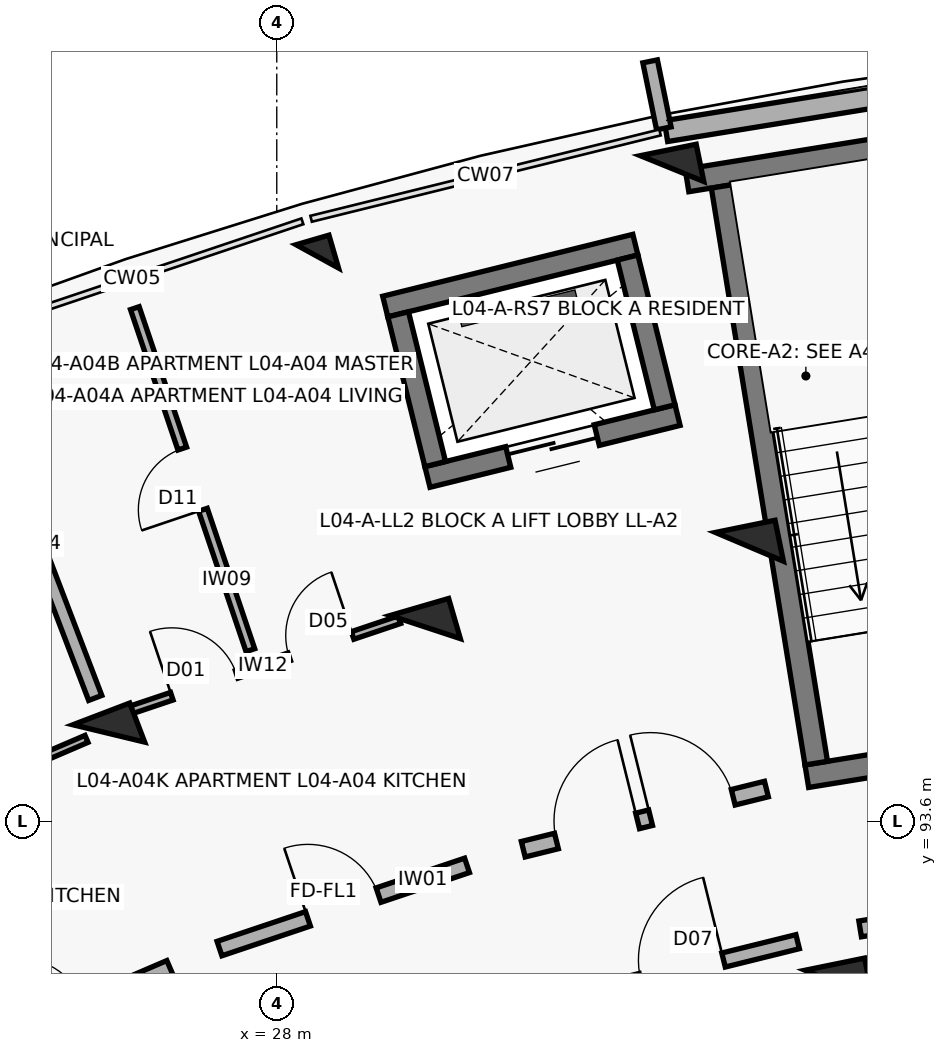
"""IFC4 building model, lengths in metres.
Left out: names, types, materials, properties, quantities, classifications, styles, units other than length and angle.
Written with IfcOpenShell. Run it as: python <this file> out.ifc"""

import sys

from ifc_helpers import new_model, si_unit, direction, frame, frame_2d, origin, origin_2d, place, context, subcontext, project, spatial, rectangle, extrude, element, fill, save


model = new_model("IFC4")
c1 = context("Model", 3, precision=1e-05, world=origin(), true_north=direction((0.0, 1.0)))
c2 = subcontext(c1, "Body", "Model", "MODEL_VIEW")
j1 = project(units=[si_unit("LENGTHUNIT", "METRE"), si_unit("PLANEANGLEUNIT", "RADIAN")], contexts=[c1])
p1 = place(None, origin())
s1 = spatial("IfcSite", under=j1, at=p1, CompositionType="ELEMENT")
p2 = place(p1, origin())
s2 = spatial("IfcBuilding", under=s1, at=p2, CompositionType="ELEMENT")
p3 = place(p2, frame((0.0, 0.0, 14.3)))
s3 = spatial("IfcBuildingStorey", under=s2, at=p3, CompositionType="ELEMENT", Elevation=14.3)
for number, where, z_axis, x_axis in (
    (1, (25.79, 94.753, 0.0), (0.0, 0.0, 1.0), (-0.357, 0.934, 0.0)),
    (2, (29.954, 96.153, 0.0), (0.0, 0.0, 1.0), (-0.28, 0.96, 0.0)),
):
    element("IfcColumn", number, at=place(p3, frame(where, z_axis=z_axis, x_axis=x_axis)), inside=s3, PredefinedType="COLUMN", context=c2, shape_type="SweptSolid", body=[
        extrude(rectangle(XDim=0.55, YDim=0.8, at=origin_2d()), origin(), (0.0, 0.0, 1.0), 3.1),
    ])
p4 = place(p3, frame((28.533, 101.031, 0.0), z_axis=(0.0, 0.0, 1.0), x_axis=(-0.27966144946, 0.96009867914, 0.0)))
e3 = element("IfcColumn", 3, at=p4, inside=s3, PredefinedType="COLUMN", context=c2, shape_type="SweptSolid", body=[
    extrude(rectangle(XDim=0.45, YDim=0.45, at=origin_2d()), origin(), (0.0, 0.0, 1.0), 3.1),
])
for number, where, z_axis, x_axis in (
    (4, (35.397, 91.448, 0.0), (0.0, 0.0, 1.0), (-0.2, 0.98, 0.0)),
    (5, (34.219, 97.209, 0.0), (0.0, 0.0, 1.0), (-0.2, 0.98, 0.0)),
):
    element("IfcColumn", number, at=place(p3, frame(where, z_axis=z_axis, x_axis=x_axis)), inside=s3, PredefinedType="COLUMN", context=c2, shape_type="SweptSolid", body=[
        extrude(rectangle(XDim=0.55, YDim=0.8, at=origin_2d()), origin(), (0.0, 0.0, 1.0), 3.1),
    ])
p5 = place(p3, frame((33.201, 102.186, 0.0), z_axis=(0.0, 0.0, 1.0), x_axis=(-0.200393999665, 0.979715389742, 0.0)))
e6 = element("IfcColumn", 6, at=p5, inside=s3, PredefinedType="COLUMN", context=c2, shape_type="SweptSolid", body=[
    extrude(rectangle(XDim=0.5, YDim=0.75, at=origin_2d()), origin(), (0.0, 0.0, 1.0), 3.1),
])
p6 = place(p3, frame((33.12, 102.679, 0.0), z_axis=(0.0, 0.0, 1.0), x_axis=(0.987080750493, 0.160223568819, 0.0)))
e7 = element("IfcWall", 7, at=p6, inside=s3, PredefinedType="SOLIDWALL", context=c2, shape_type="SweptSolid", body=[
    extrude(rectangle(XDim=4.809, YDim=0.278, at=frame_2d((2.404, 0.0))), origin(), (0.0, 0.0, 1.0), 2.25),
])
p7 = place(p3, frame((33.093, 102.715, 0.0), z_axis=(0.0, 0.0, 1.0), x_axis=(-0.200183211319, 0.979758481416, 0.0)))
e8 = element("IfcWall", 8, at=p7, inside=s3, PredefinedType="PARAPET", context=c2, shape_type="SweptSolid", body=[
    extrude(rectangle(XDim=0.9, YDim=0.195, at=frame_2d((0.45, 0.0))), origin(), (0.0, 0.0, 1.0), 2.25),
])
p8 = place(p3, frame((38.794, 94.811, 0.0), z_axis=(0.0, 0.0, 1.0), x_axis=(-0.987077443397, -0.160243941341, 0.0)))
e9 = element("IfcWall", 9, at=p8, inside=s3, PredefinedType="SHEAR", context=c2, shape_type="SweptSolid", body=[
    extrude(rectangle(XDim=3.87, YDim=0.3, at=frame_2d((1.935, 0.0))), origin(), (0.0, 0.0, 1.0), 3.1),
])
p9 = place(p8, frame((1.41, 0.0, 0.0)))
e10 = element("IfcOpeningElement", 10, at=p9, cuts=e9, PredefinedType="OPENING", context=c2, shape_type="SweptSolid", body=[
    extrude(rectangle(XDim=1.05, YDim=2.15, at=frame_2d((0.525, 1.075))), frame((0.0, 0.16, 0.0), z_axis=(0.0, -1.0, 0.0), x_axis=(1.0, 0.0, 0.0)), (0.0, 0.0, 1.0), 0.32),
])
p10 = place(p3, frame((37.81, 102.745, 0.0), z_axis=(0.0, 0.0, 1.0), x_axis=(-0.987084710126, -0.160199173019, 0.0)))
e11 = element("IfcWall", 11, at=p10, inside=s3, PredefinedType="SHEAR", context=c2, shape_type="SweptSolid", body=[
    extrude(rectangle(XDim=4.47, YDim=0.3, at=frame_2d((2.235, 0.0))), origin(), (0.0, 0.0, 1.0), 3.1),
])
p11 = place(p3, frame((35.098, 94.363, 0.0), z_axis=(0.0, 0.0, 1.0), x_axis=(-0.160227496777, 0.987080112897, 0.0)))
e12 = element("IfcWall", 12, at=p11, inside=s3, PredefinedType="SHEAR", context=c2, shape_type="SweptSolid", body=[
    extrude(rectangle(XDim=7.69, YDim=0.3, at=frame_2d((3.845, 0.0))), origin(), (0.0, 0.0, 1.0), 3.1),
])
p12 = place(p3, frame((33.273, 98.942, 0.0), z_axis=(0.0, 0.0, 1.0), x_axis=(-0.970707542441, -0.240264160972, 0.0)))
e13 = element("IfcWall", 13, at=p12, inside=s3, PredefinedType="SHEAR", context=c2, shape_type="SweptSolid", body=[
    extrude(rectangle(XDim=3.39, YDim=0.28, at=frame_2d((1.695, 0.0))), origin(), (0.0, 0.0, 1.0), 3.1),
])
p13 = place(p12, frame((1.095, 0.0, 0.0)))
e14 = element("IfcOpeningElement", 14, at=p13, cuts=e13, PredefinedType="OPENING", context=c2, shape_type="SweptSolid", body=[
    extrude(rectangle(XDim=1.2, YDim=2.15, at=frame_2d((0.6, 1.075))), frame((0.0, 0.15, 0.0), z_axis=(0.0, -1.0, 0.0), x_axis=(1.0, 0.0, 0.0)), (0.0, 0.0, 1.0), 0.3),
])
p14 = place(p3, frame((32.718, 101.185, 0.0), z_axis=(0.0, 0.0, 1.0), x_axis=(-0.970711699588, -0.240247364777, 0.0)))
e15 = element("IfcWall", 15, at=p14, inside=s3, PredefinedType="SHEAR", context=c2, shape_type="SweptSolid", body=[
    extrude(rectangle(XDim=3.39, YDim=0.28, at=frame_2d((1.695, 0.0))), origin(), (0.0, 0.0, 1.0), 3.1),
])
p15 = place(p3, frame((33.104, 99.044, 0.0), z_axis=(0.0, 0.0, 1.0), x_axis=(-0.240186044774, 0.970726873995, 0.0)))
e16 = element("IfcWall", 16, at=p15, inside=s3, PredefinedType="SHEAR", context=c2, shape_type="SweptSolid", body=[
    extrude(rectangle(XDim=2.03, YDim=0.28, at=frame_2d((1.015, 0.0))), origin(), (0.0, 0.0, 1.0), 3.1),
])
p16 = place(p3, frame((30.085, 98.297, 0.0), z_axis=(0.0, 0.0, 1.0), x_axis=(-0.2402993748, 0.970698825832, 0.0)))
e17 = element("IfcWall", 17, at=p16, inside=s3, PredefinedType="SHEAR", context=c2, shape_type="SweptSolid", body=[
    extrude(rectangle(XDim=2.03, YDim=0.28, at=frame_2d((1.015, 0.0))), origin(), (0.0, 0.0, 1.0), 3.1),
])
p17 = place(p3, frame((23.437, 90.316, 0.0), z_axis=(0.0, 0.0, 1.0), x_axis=(0.918718172399, 0.394913813008, 0.0)))
e18 = element("IfcWall", 18, at=p17, inside=s3, PredefinedType="SOLIDWALL", context=c2, shape_type="SweptSolid", body=[
    extrude(rectangle(XDim=3.436, YDim=0.2, at=frame_2d((1.718, 0.0))), origin(), (0.0, 0.0, 1.0), 2.08),
])
p18 = place(p17, frame((1.208, 0.0, 0.0)))
e19 = element("IfcOpeningElement", 19, at=p18, cuts=e18, PredefinedType="OPENING", context=c2, shape_type="SweptSolid", body=[
    extrude(rectangle(XDim=1.02, YDim=2.15, at=frame_2d((0.51, 1.075))), frame((0.0, 0.11, 0.0), z_axis=(0.0, -1.0, 0.0), x_axis=(1.0, 0.0, 0.0)), (0.0, 0.0, 1.0), 0.22),
])
p19 = place(p3, frame((22.008, 93.182, 0.0), z_axis=(0.0, 0.0, 1.0), x_axis=(0.918732171064, 0.394881245253, 0.0)))
e20 = element("IfcWall", 20, at=p19, inside=s3, PredefinedType="PARTITIONING", context=c2, shape_type="SweptSolid", body=[
    extrude(rectangle(XDim=3.797, YDim=0.1, at=frame_2d((1.899, 0.0))), origin(), (0.0, 0.0, 1.0), 2.08),
])
p20 = place(p19, frame((0.65, 0.0, 0.0)))
e21 = element("IfcOpeningElement", 21, at=p20, cuts=e20, PredefinedType="OPENING", context=c2, shape_type="SweptSolid", body=[
    extrude(rectangle(XDim=0.9, YDim=2.1, at=frame_2d((0.45, 1.05))), frame((0.0, 0.06, 0.0), z_axis=(0.0, -1.0, 0.0), x_axis=(1.0, 0.0, 0.0)), (0.0, 0.0, 1.0), 0.12),
])
p21 = place(p19, frame((2.267, 0.0, 0.0)))
e22 = element("IfcOpeningElement", 22, at=p21, cuts=e20, PredefinedType="OPENING", context=c2, shape_type="SweptSolid", body=[
    extrude(rectangle(XDim=0.88, YDim=2.1, at=frame_2d((0.44, 1.05))), frame((0.0, 0.06, 0.0), z_axis=(0.0, -1.0, 0.0), x_axis=(1.0, 0.0, 0.0)), (0.0, 0.0, 1.0), 0.12),
])
p22 = place(p3, frame((27.247, 91.923, 0.0), z_axis=(0.0, 0.0, 1.0), x_axis=(0.947863007629, 0.318678080151, 0.0)))
e23 = element("IfcWall", 23, at=p22, inside=s3, PredefinedType="SOLIDWALL", context=c2, shape_type="SweptSolid", body=[
    extrude(rectangle(XDim=3.436, YDim=0.2, at=frame_2d((1.718, 0.0))), origin(), (0.0, 0.0, 1.0), 2.08),
])
p23 = place(p22, frame((1.228, 0.0, 0.0)))
e24 = element("IfcOpeningElement", 24, at=p23, cuts=e23, PredefinedType="OPENING", context=c2, shape_type="SweptSolid", body=[
    extrude(rectangle(XDim=0.98, YDim=2.15, at=frame_2d((0.49, 1.075))), frame((0.0, 0.11, 0.0), z_axis=(0.0, -1.0, 0.0), x_axis=(1.0, 0.0, 0.0)), (0.0, 0.0, 1.0), 0.22),
])
p24 = place(p3, frame((26.003, 95.036, 0.0), z_axis=(0.0, 0.0, 1.0), x_axis=(0.947879193428, 0.318629933725, 0.0)))
e25 = element("IfcWall", 25, at=p24, inside=s3, PredefinedType="PARTITIONING", context=c2, shape_type="SweptSolid", body=[
    extrude(rectangle(XDim=3.81, YDim=0.105, at=frame_2d((1.905, 0.0))), origin(), (0.0, 0.0, 1.0), 2.08),
])
p25 = place(p24, frame((0.65, 0.0, 0.0)))
e26 = element("IfcOpeningElement", 26, at=p25, cuts=e25, PredefinedType="OPENING", context=c2, shape_type="SweptSolid", body=[
    extrude(rectangle(XDim=0.9, YDim=2.1, at=frame_2d((0.45, 1.05))), frame((0.0, 0.062, 0.0), z_axis=(0.0, -1.0, 0.0), x_axis=(1.0, 0.0, 0.0)), (0.0, 0.0, 1.0), 0.125),
])
p26 = place(p24, frame((2.28, 0.0, 0.0)))
e27 = element("IfcOpeningElement", 27, at=p26, cuts=e25, PredefinedType="OPENING", context=c2, shape_type="SweptSolid", body=[
    extrude(rectangle(XDim=0.88, YDim=2.1, at=frame_2d((0.44, 1.05))), frame((0.0, 0.062, 0.0), z_axis=(0.0, -1.0, 0.0), x_axis=(1.0, 0.0, 0.0)), (0.0, 0.0, 1.0), 0.125),
])
p27 = place(p3, frame((27.653, 95.849, 0.0), z_axis=(0.0, 0.0, 1.0), x_axis=(-0.320049134076, 0.947400945628, 0.0)))
e28 = element("IfcWall", 28, at=p27, inside=s3, PredefinedType="PARTITIONING", context=c2, shape_type="SweptSolid", body=[
    extrude(rectangle(XDim=4.75, YDim=0.12, at=frame_2d((2.375, 0.0))), origin(), (0.0, 0.0, 1.0), 2.08),
])
p28 = place(p27, frame((1.95, 0.0, 0.0)))
e29 = element("IfcOpeningElement", 29, at=p28, cuts=e28, PredefinedType="OPENING", context=c2, shape_type="SweptSolid", body=[
    extrude(rectangle(XDim=0.85, YDim=2.1, at=frame_2d((0.425, 1.05))), frame((0.0, 0.07, 0.0), z_axis=(0.0, -1.0, 0.0), x_axis=(1.0, 0.0, 0.0)), (0.0, 0.0, 1.0), 0.14),
])
p29 = place(p3, frame((25.611, 95.22, 0.0), z_axis=(0.0, 0.0, 1.0), x_axis=(-0.357064016205, 0.934079915388, 0.0)))
e30 = element("IfcWall", 30, at=p29, inside=s3, PredefinedType="SOLIDWALL", context=c2, shape_type="SweptSolid", body=[
    extrude(rectangle(XDim=4.35, YDim=0.185, at=frame_2d((2.175, 0.0))), origin(), (0.0, 0.0, 1.0), 2.08),
])
p30 = place(p3, frame((31.243, 93.23, 0.0), z_axis=(0.0, 0.0, 1.0), x_axis=(0.970719238682, 0.240216901263, 0.0)))
e31 = element("IfcWall", 31, at=p30, inside=s3, PredefinedType="SOLIDWALL", context=c2, shape_type="SweptSolid", body=[
    extrude(rectangle(XDim=3.296, YDim=0.21, at=frame_2d((1.648, 0.0))), origin(), (0.0, 0.0, 1.0), 2.08),
])
p31 = place(p30, frame((0.45, 0.0, 0.0)))
e32 = element("IfcOpeningElement", 32, at=p31, cuts=e31, PredefinedType="OPENING", context=c2, shape_type="SweptSolid", body=[
    extrude(rectangle(XDim=1.1, YDim=2.15, at=frame_2d((0.55, 1.075))), frame((0.0, 0.115, 0.0), z_axis=(0.0, -1.0, 0.0), x_axis=(1.0, 0.0, 0.0)), (0.0, 0.0, 1.0), 0.23),
])
p32 = place(p30, frame((1.726, 0.0, 0.0)))
e33 = element("IfcOpeningElement", 33, at=p32, cuts=e31, PredefinedType="OPENING", context=c2, shape_type="SweptSolid", body=[
    extrude(rectangle(XDim=1.12, YDim=2.15, at=frame_2d((0.56, 1.075))), frame((0.0, 0.115, 0.0), z_axis=(0.0, -1.0, 0.0), x_axis=(1.0, 0.0, 0.0)), (0.0, 0.0, 1.0), 0.23),
])
p33 = place(p3, frame((31.816, 91.262, 0.0), z_axis=(0.0, 0.0, 1.0), x_axis=(0.970727194092, 0.240184751078, 0.0)))
e34 = element("IfcWall", 34, at=p33, inside=s3, PredefinedType="SOLIDWALL", context=c2, shape_type="SweptSolid", body=[
    extrude(rectangle(XDim=3.129, YDim=0.19, at=frame_2d((1.564, 0.0))), origin(), (0.0, 0.0, 1.0), 2.08),
])
p34 = place(p33, frame((1.004, 0.0, 0.0)))
e35 = element("IfcOpeningElement", 35, at=p34, cuts=e34, PredefinedType="OPENING", context=c2, shape_type="SweptSolid", body=[
    extrude(rectangle(XDim=1.12, YDim=2.15, at=frame_2d((0.56, 1.075))), frame((0.0, 0.105, 0.0), z_axis=(0.0, -1.0, 0.0), x_axis=(1.0, 0.0, 0.0)), (0.0, 0.0, 1.0), 0.21),
])
p35 = place(p3, frame((35.676, 92.181, 0.0), z_axis=(0.0, 0.0, 1.0), x_axis=(0.98707079686, 0.160284877599, 0.0)))
e36 = element("IfcWall", 36, at=p35, inside=s3, PredefinedType="SOLIDWALL", context=c2, shape_type="SweptSolid", body=[
    extrude(rectangle(XDim=3.129, YDim=0.21, at=frame_2d((1.564, 0.0))), origin(), (0.0, 0.0, 1.0), 2.08),
])
p36 = place(p35, frame((1.014, 0.0, 0.0)))
e37 = element("IfcOpeningElement", 37, at=p36, cuts=e36, PredefinedType="OPENING", context=c2, shape_type="SweptSolid", body=[
    extrude(rectangle(XDim=1.1, YDim=2.15, at=frame_2d((0.55, 1.075))), frame((0.0, 0.115, 0.0), z_axis=(0.0, -1.0, 0.0), x_axis=(1.0, 0.0, 0.0)), (0.0, 0.0, 1.0), 0.23),
])
p37 = place(p13, origin())
e38 = element("IfcDoor", 38, at=p37, inside=s3, OperationType="DOUBLE_DOOR_SLIDING", PredefinedType="DOOR", context=c2, shape_type="SweptSolid", body=[
    extrude(rectangle(XDim=1.2, YDim=2.15, at=frame_2d((0.6, 1.075))), frame((0.0, 0.025, 0.0), z_axis=(0.0, -1.0, 0.0), x_axis=(1.0, 0.0, 0.0)), (0.0, 0.0, 1.0), 0.05),
])
fill(e14, e38)
p38 = place(p23, origin())
e39 = element("IfcDoor", 39, at=p38, inside=s3, OperationType="SINGLE_SWING_LEFT", PredefinedType="DOOR", context=c2, shape_type="SweptSolid", body=[
    extrude(rectangle(XDim=0.98, YDim=2.15, at=frame_2d((0.49, 1.075))), frame((0.0, 0.025, 0.0), z_axis=(0.0, -1.0, 0.0), x_axis=(1.0, 0.0, 0.0)), (0.0, 0.0, 1.0), 0.05),
])
fill(e24, e39)
p39 = place(p25, origin())
e40 = element("IfcDoor", 40, at=p39, inside=s3, OperationType="SINGLE_SWING_LEFT", PredefinedType="DOOR", context=c2, shape_type="SweptSolid", body=[
    extrude(rectangle(XDim=0.9, YDim=2.1, at=frame_2d((0.45, 1.05))), frame((0.0, 0.025, 0.0), z_axis=(0.0, -1.0, 0.0), x_axis=(1.0, 0.0, 0.0)), (0.0, 0.0, 1.0), 0.05),
])
fill(e26, e40)
p40 = place(p26, origin())
e41 = element("IfcDoor", 41, at=p40, inside=s3, OperationType="SINGLE_SWING_RIGHT", PredefinedType="DOOR", context=c2, shape_type="SweptSolid", body=[
    extrude(rectangle(XDim=0.88, YDim=2.1, at=frame_2d((0.44, 1.05))), frame((0.0, 0.025, 0.0), z_axis=(0.0, -1.0, 0.0), x_axis=(1.0, 0.0, 0.0)), (0.0, 0.0, 1.0), 0.05),
])
fill(e27, e41)
p41 = place(p28, origin())
e42 = element("IfcDoor", 42, at=p41, inside=s3, OperationType="SINGLE_SWING_LEFT", PredefinedType="DOOR", context=c2, shape_type="SweptSolid", body=[
    extrude(rectangle(XDim=0.85, YDim=2.1, at=frame_2d((0.425, 1.05))), frame((0.0, 0.025, 0.0), z_axis=(0.0, -1.0, 0.0), x_axis=(1.0, 0.0, 0.0)), (0.0, 0.0, 1.0), 0.05),
])
fill(e29, e42)
p42 = place(p31, origin())
e43 = element("IfcDoor", 43, at=p42, inside=s3, OperationType="SINGLE_SWING_RIGHT", PredefinedType="DOOR", context=c2, shape_type="SweptSolid", body=[
    extrude(rectangle(XDim=1.1, YDim=2.15, at=frame_2d((0.55, 1.075))), frame((0.0, 0.025, 0.0), z_axis=(0.0, -1.0, 0.0), x_axis=(1.0, 0.0, 0.0)), (0.0, 0.0, 1.0), 0.05),
])
fill(e32, e43)
p43 = place(p32, origin())
e44 = element("IfcDoor", 44, at=p43, inside=s3, OperationType="SINGLE_SWING_LEFT", PredefinedType="DOOR", context=c2, shape_type="SweptSolid", body=[
    extrude(rectangle(XDim=1.12, YDim=2.15, at=frame_2d((0.56, 1.075))), frame((0.0, 0.025, 0.0), z_axis=(0.0, -1.0, 0.0), x_axis=(1.0, 0.0, 0.0)), (0.0, 0.0, 1.0), 0.05),
])
fill(e33, e44)
p44 = place(p34, origin())
e45 = element("IfcDoor", 45, at=p44, inside=s3, OperationType="SINGLE_SWING_RIGHT", PredefinedType="DOOR", context=c2, shape_type="SweptSolid", body=[
    extrude(rectangle(XDim=1.12, YDim=2.15, at=frame_2d((0.56, 1.075))), frame((0.0, 0.025, 0.0), z_axis=(0.0, -1.0, 0.0), x_axis=(1.0, 0.0, 0.0)), (0.0, 0.0, 1.0), 0.05),
])
fill(e35, e45)
save(model, sys.argv[1])
